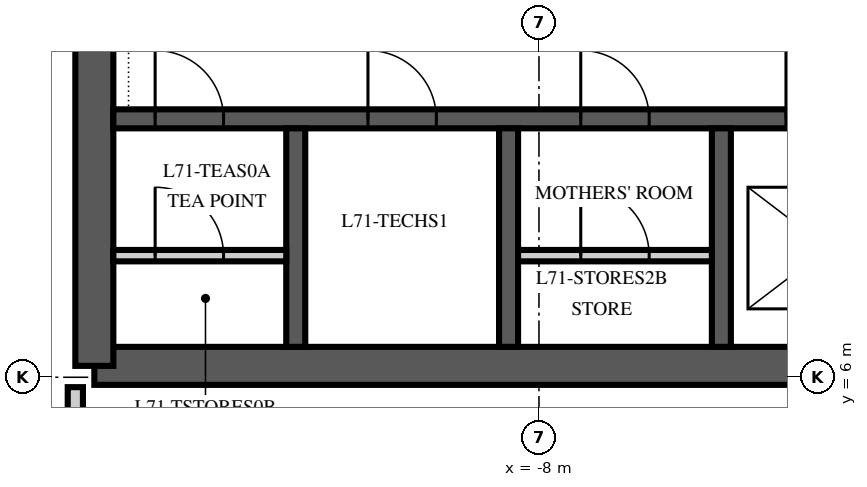
"""IFC4 building model, lengths in metres.
Left out: names, types, materials, properties, quantities, classifications, styles, units other than length and angle.
Written with IfcOpenShell. Run it as: python <this file> out.ifc"""

import sys

from ifc_helpers import new_model, si_unit, direction, frame, frame_2d, origin, place, context, subcontext, project, spatial, polyline, rectangle, outline, extrude, element, fill, save


model = new_model("IFC4")
c1 = context("Model", 3, precision=1e-05, world=origin(), true_north=direction((0.0, 1.0)))
c2 = subcontext(c1, "Body", "Model", "MODEL_VIEW")
j1 = project(units=[si_unit("LENGTHUNIT", "METRE"), si_unit("PLANEANGLEUNIT", "RADIAN")], contexts=[c1])
p1 = place(None, origin())
s1 = spatial("IfcSite", under=j1, at=p1, CompositionType="ELEMENT")
p2 = place(p1, origin())
s2 = spatial("IfcBuilding", under=s1, at=p2, CompositionType="ELEMENT")
p3 = place(p2, frame((0.0, 0.0, 304.0)))
s3 = spatial("IfcBuildingStorey", under=s2, at=p3, CompositionType="ELEMENT", Elevation=304.0)
p4 = place(p3, frame((-13.85, 6.15, 0.0), z_axis=(0.0, 0.0, 1.0), x_axis=(1.0, 0.0, 0.0)))
e1 = element("IfcWall", 1, at=p4, inside=s3, PredefinedType="SHEAR", context=c2, shape_type="SweptSolid", body=[
    extrude(rectangle(XDim=27.7, YDim=0.5, at=frame_2d((13.85, 0.0))), origin(), (0.0, 0.0, 1.0), 4.0),
])
p5 = place(p3, frame((-13.85, 23.85, 0.0), z_axis=(0.0, 0.0, 1.0), x_axis=(0.0, -1.0, 0.0)))
e2 = element("IfcWall", 2, at=p5, inside=s3, PredefinedType="SHEAR", context=c2, shape_type="SweptSolid", body=[
    extrude(outline(polyline([(0.0, -0.25), (17.7, -0.25), (17.7, 0.0), (17.45, 0.0), (17.45, 0.25), (0.25, 0.25), (0.25, 0.0), (0.0, 0.0), (0.0, -0.25)])), origin(), (0.0, 0.0, 1.0), 4.0),
])
p6 = place(p5, frame((11.75, 0.0, 0.0)))
e3 = element("IfcOpeningElement", 3, at=p6, cuts=e2, PredefinedType="OPENING", context=c2, shape_type="SweptSolid", body=[
    extrude(rectangle(XDim=1.8, YDim=2.4, at=frame_2d((0.9, 1.2))), frame((0.0, 0.265, 0.0), z_axis=(0.0, -1.0, 0.0), x_axis=(1.0, 0.0, 0.0)), (0.0, 0.0, 1.0), 0.53),
])
p7 = place(p3, frame((-13.6, 9.4, 0.0), z_axis=(0.0, 0.0, 1.0), x_axis=(1.0, 0.0, 0.0)))
e4 = element("IfcWall", 4, at=p7, inside=s3, PredefinedType="SHEAR", context=c2, shape_type="SweptSolid", body=[
    extrude(rectangle(XDim=27.2, YDim=0.25, at=frame_2d((13.6, 0.0))), origin(), (0.0, 0.0, 1.0), 4.0),
])
p8 = place(p7, frame((8.85, 0.0, 0.0)))
e5 = element("IfcOpeningElement", 5, at=p8, cuts=e4, PredefinedType="OPENING", context=c2, shape_type="SweptSolid", body=[
    extrude(rectangle(XDim=1.1, YDim=2.1, at=frame_2d((0.55, 1.05))), frame((0.0, 0.14, 0.0), z_axis=(0.0, -1.0, 0.0), x_axis=(1.0, 0.0, 0.0)), (0.0, 0.0, 1.0), 0.28),
])
p9 = place(p7, frame((11.65, 0.0, 0.0)))
e6 = element("IfcOpeningElement", 6, at=p9, cuts=e4, PredefinedType="OPENING", context=c2, shape_type="SweptSolid", body=[
    extrude(rectangle(XDim=1.1, YDim=2.1, at=frame_2d((0.55, 1.05))), frame((0.0, 0.14, 0.0), z_axis=(0.0, -1.0, 0.0), x_axis=(1.0, 0.0, 0.0)), (0.0, 0.0, 1.0), 0.28),
])
p10 = place(p7, frame((14.45, 0.0, 0.0)))
e7 = element("IfcOpeningElement", 7, at=p10, cuts=e4, PredefinedType="OPENING", context=c2, shape_type="SweptSolid", body=[
    extrude(rectangle(XDim=1.1, YDim=2.1, at=frame_2d((0.55, 1.05))), frame((0.0, 0.14, 0.0), z_axis=(0.0, -1.0, 0.0), x_axis=(1.0, 0.0, 0.0)), (0.0, 0.0, 1.0), 0.28),
])
p11 = place(p7, frame((0.55, 0.0, 0.0)))
e8 = element("IfcOpeningElement", 8, at=p11, cuts=e4, PredefinedType="OPENING", context=c2, shape_type="SweptSolid", body=[
    extrude(rectangle(XDim=0.9, YDim=2.1, at=frame_2d((0.45, 1.05))), frame((0.0, 0.14, 0.0), z_axis=(0.0, -1.0, 0.0), x_axis=(1.0, 0.0, 0.0)), (0.0, 0.0, 1.0), 0.28),
])
p12 = place(p7, frame((3.35, 0.0, 0.0)))
e9 = element("IfcOpeningElement", 9, at=p12, cuts=e4, PredefinedType="OPENING", context=c2, shape_type="SweptSolid", body=[
    extrude(rectangle(XDim=0.9, YDim=2.1, at=frame_2d((0.45, 1.05))), frame((0.0, 0.14, 0.0), z_axis=(0.0, -1.0, 0.0), x_axis=(1.0, 0.0, 0.0)), (0.0, 0.0, 1.0), 0.28),
])
p13 = place(p7, frame((6.15, 0.0, 0.0)))
e10 = element("IfcOpeningElement", 10, at=p13, cuts=e4, PredefinedType="OPENING", context=c2, shape_type="SweptSolid", body=[
    extrude(rectangle(XDim=0.9, YDim=2.1, at=frame_2d((0.45, 1.05))), frame((0.0, 0.14, 0.0), z_axis=(0.0, -1.0, 0.0), x_axis=(1.0, 0.0, 0.0)), (0.0, 0.0, 1.0), 0.28),
])
p14 = place(p7, frame((17.35, 0.0, 0.0)))
e11 = element("IfcOpeningElement", 11, at=p14, cuts=e4, PredefinedType="OPENING", context=c2, shape_type="SweptSolid", body=[
    extrude(rectangle(XDim=0.9, YDim=2.1, at=frame_2d((0.45, 1.05))), frame((0.0, 0.14, 0.0), z_axis=(0.0, -1.0, 0.0), x_axis=(1.0, 0.0, 0.0)), (0.0, 0.0, 1.0), 0.28),
])
p15 = place(p7, frame((20.15, 0.0, 0.0)))
e12 = element("IfcOpeningElement", 12, at=p15, cuts=e4, PredefinedType="OPENING", context=c2, shape_type="SweptSolid", body=[
    extrude(rectangle(XDim=0.9, YDim=2.1, at=frame_2d((0.45, 1.05))), frame((0.0, 0.14, 0.0), z_axis=(0.0, -1.0, 0.0), x_axis=(1.0, 0.0, 0.0)), (0.0, 0.0, 1.0), 0.28),
])
p16 = place(p7, frame((22.95, 0.0, 0.0)))
e13 = element("IfcOpeningElement", 13, at=p16, cuts=e4, PredefinedType="OPENING", context=c2, shape_type="SweptSolid", body=[
    extrude(rectangle(XDim=0.9, YDim=2.1, at=frame_2d((0.45, 1.05))), frame((0.0, 0.14, 0.0), z_axis=(0.0, -1.0, 0.0), x_axis=(1.0, 0.0, 0.0)), (0.0, 0.0, 1.0), 0.28),
])
for number, where, z_axis, x_axis in (
    (14, (-11.2, 6.4, 0.0), (0.0, 0.0, 1.0), (0.0, 1.0, 0.0)),
    (15, (-8.4, 6.4, 0.0), (0.0, 0.0, 1.0), (0.0, 1.0, 0.0)),
    (16, (-5.6, 6.4, 0.0), (0.0, 0.0, 1.0), (0.0, 1.0, 0.0)),
):
    element("IfcWall", number, at=place(p3, frame(where, z_axis=z_axis, x_axis=x_axis)), inside=s3, PredefinedType="SHEAR", context=c2, shape_type="SweptSolid", body=[
        extrude(rectangle(XDim=2.875, YDim=0.25, at=frame_2d((1.438, 0.0))), origin(), (0.0, 0.0, 1.0), 4.0),
    ])
p17 = place(p3, frame((-13.6, 7.6, 0.0), z_axis=(0.0, 0.0, 1.0), x_axis=(1.0, 0.0, 0.0)))
e17 = element("IfcWall", 17, at=p17, inside=s3, PredefinedType="PARTITIONING", context=c2, shape_type="SweptSolid", body=[
    extrude(rectangle(XDim=2.275, YDim=0.15, at=frame_2d((1.138, 0.0))), origin(), (0.0, 0.0, 1.0), 3.85),
])
p18 = place(p17, frame((0.55, 0.0, 0.0)))
e18 = element("IfcOpeningElement", 18, at=p18, cuts=e17, PredefinedType="OPENING", context=c2, shape_type="SweptSolid", body=[
    extrude(rectangle(XDim=0.9, YDim=2.1, at=frame_2d((0.45, 1.05))), frame((0.0, 0.09, 0.0), z_axis=(0.0, -1.0, 0.0), x_axis=(1.0, 0.0, 0.0)), (0.0, 0.0, 1.0), 0.18),
])
p19 = place(p3, frame((-8.275, 7.6, 0.0), z_axis=(0.0, 0.0, 1.0), x_axis=(1.0, 0.0, 0.0)))
e19 = element("IfcWall", 19, at=p19, inside=s3, PredefinedType="PARTITIONING", context=c2, shape_type="SweptSolid", body=[
    extrude(rectangle(XDim=2.55, YDim=0.15, at=frame_2d((1.275, 0.0))), origin(), (0.0, 0.0, 1.0), 3.85),
])
p20 = place(p19, frame((0.825, 0.0, 0.0)))
e20 = element("IfcOpeningElement", 20, at=p20, cuts=e19, PredefinedType="OPENING", context=c2, shape_type="SweptSolid", body=[
    extrude(rectangle(XDim=0.9, YDim=2.1, at=frame_2d((0.45, 1.05))), frame((0.0, 0.09, 0.0), z_axis=(0.0, -1.0, 0.0), x_axis=(1.0, 0.0, 0.0)), (0.0, 0.0, 1.0), 0.18),
])
p21 = place(p3, frame((-14.1, 4.05, 0.0), z_axis=(0.0, 0.0, 1.0), x_axis=(0.0, 1.0, 0.0)))
e21 = element("IfcWall", 21, at=p21, inside=s3, PredefinedType="PARTITIONING", context=c2, shape_type="SweptSolid", body=[
    extrude(rectangle(XDim=1.82, YDim=0.2, at=frame_2d((0.91, 0.0))), origin(), (0.0, 0.0, 1.0), 2.15),
])
p22 = place(p8, origin())
e22 = element("IfcDoor", 22, at=p22, inside=s3, OperationType="SLIDING_TO_LEFT", PredefinedType="DOOR", context=c2, shape_type="SweptSolid", body=[
    extrude(rectangle(XDim=1.1, YDim=2.1, at=frame_2d((0.55, 1.05))), frame((0.0, 0.125, 0.0), z_axis=(0.0, -1.0, 0.0), x_axis=(1.0, 0.0, 0.0)), (0.0, 0.0, 1.0), 0.25),
])
fill(e5, e22)
p23 = place(p11, origin())
e23 = element("IfcDoor", 23, at=p23, inside=s3, OperationType="SINGLE_SWING_LEFT", PredefinedType="DOOR", context=c2, shape_type="SweptSolid", body=[
    extrude(rectangle(XDim=0.9, YDim=2.1, at=frame_2d((0.45, 1.05))), frame((0.0, 0.125, 0.0), z_axis=(0.0, -1.0, 0.0), x_axis=(1.0, 0.0, 0.0)), (0.0, 0.0, 1.0), 0.25),
])
fill(e8, e23)
p24 = place(p18, origin())
e24 = element("IfcDoor", 24, at=p24, inside=s3, OperationType="SINGLE_SWING_LEFT", PredefinedType="DOOR", context=c2, shape_type="SweptSolid", body=[
    extrude(rectangle(XDim=0.9, YDim=2.1, at=frame_2d((0.45, 1.05))), frame((0.0, 0.075, 0.0), z_axis=(0.0, -1.0, 0.0), x_axis=(1.0, 0.0, 0.0)), (0.0, 0.0, 1.0), 0.149),
])
fill(e18, e24)
p25 = place(p12, origin())
e25 = element("IfcDoor", 25, at=p25, inside=s3, OperationType="SINGLE_SWING_LEFT", PredefinedType="DOOR", context=c2, shape_type="SweptSolid", body=[
    extrude(rectangle(XDim=0.9, YDim=2.1, at=frame_2d((0.45, 1.05))), frame((0.0, 0.125, 0.0), z_axis=(0.0, -1.0, 0.0), x_axis=(1.0, 0.0, 0.0)), (0.0, 0.0, 1.0), 0.25),
])
fill(e9, e25)
p26 = place(p13, origin())
e26 = element("IfcDoor", 26, at=p26, inside=s3, OperationType="SINGLE_SWING_LEFT", PredefinedType="DOOR", context=c2, shape_type="SweptSolid", body=[
    extrude(rectangle(XDim=0.9, YDim=2.1, at=frame_2d((0.45, 1.05))), frame((0.0, 0.125, 0.0), z_axis=(0.0, -1.0, 0.0), x_axis=(1.0, 0.0, 0.0)), (0.0, 0.0, 1.0), 0.25),
])
fill(e10, e26)
p27 = place(p20, origin())
e27 = element("IfcDoor", 27, at=p27, inside=s3, OperationType="SINGLE_SWING_LEFT", PredefinedType="DOOR", context=c2, shape_type="SweptSolid", body=[
    extrude(rectangle(XDim=0.9, YDim=2.1, at=frame_2d((0.45, 1.05))), frame((0.0, 0.075, 0.0), z_axis=(0.0, -1.0, 0.0), x_axis=(1.0, 0.0, 0.0)), (0.0, 0.0, 1.0), 0.149),
])
fill(e20, e27)
save(model, sys.argv[1])
